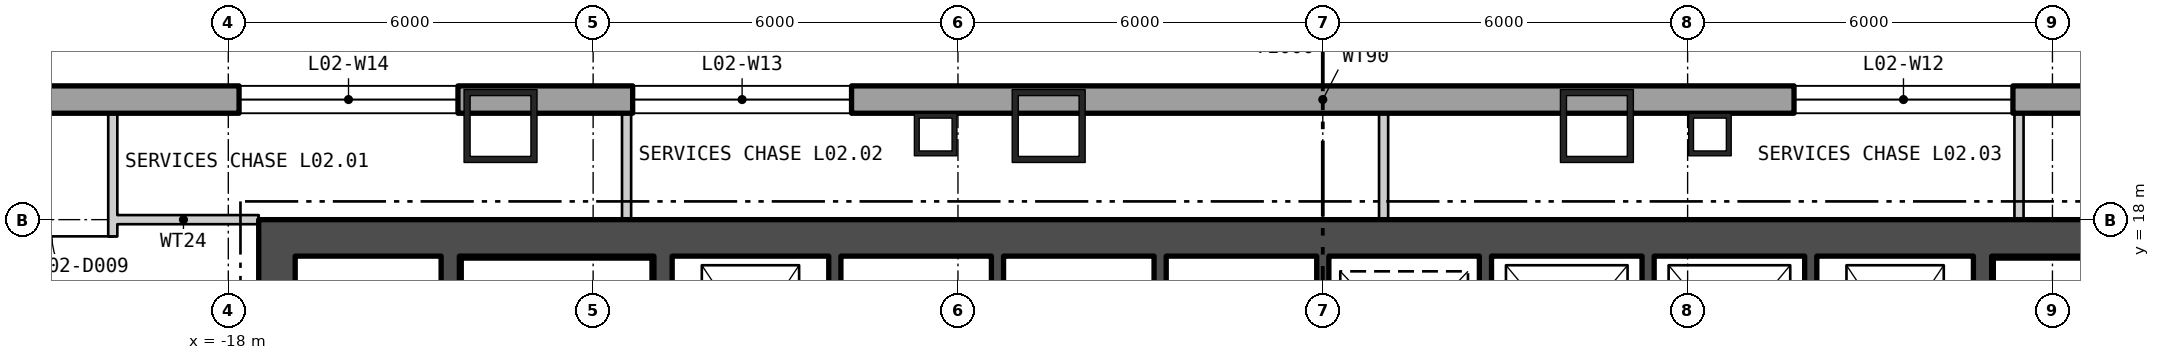
"""IFC4 building model, lengths in metres.
Left out: names, types, materials, properties, quantities, classifications, styles, units other than length and angle.
Written with IfcOpenShell. Run it as: python <this file> out.ifc"""

import sys

from ifc_helpers import new_model, si_unit, direction, frame, frame_2d, origin, origin_2d, place, context, subcontext, project, spatial, polyline, rectangle, hollow_rectangle, outline, extrude, element, fill, save


model = new_model("IFC4")
c1 = context("Model", 3, precision=1e-05, world=origin(), true_north=direction((0.0, 1.0)))
c2 = subcontext(c1, "Body", "Model", "MODEL_VIEW")
j1 = project(units=[si_unit("LENGTHUNIT", "METRE"), si_unit("PLANEANGLEUNIT", "RADIAN")], contexts=[c1])
p1 = place(None, origin())
s1 = spatial("IfcSite", under=j1, at=p1, CompositionType="ELEMENT")
p2 = place(p1, origin())
s2 = spatial("IfcBuilding", under=s1, at=p2, CompositionType="ELEMENT")
p3 = place(p2, frame((0.0, 0.0, 13.5)))
s3 = spatial("IfcBuildingStorey", under=s2, at=p3, CompositionType="ELEMENT", Elevation=13.5)
for number, where, z_axis, x_axis in (
    (1, (4.508, 19.54, 0.0), (0.0, 0.0, 1.0), (-1.0, 0.0, 0.0)),
    (2, (-4.508, 19.54, 0.0), (0.0, 0.0, 1.0), (-1.0, 0.0, 0.0)),
    (3, (-13.523, 19.54, 0.0), (0.0, 0.0, 1.0), (-1.0, 0.0, 0.0)),
):
    element("IfcColumn", number, at=place(p3, frame(where, z_axis=z_axis, x_axis=x_axis)), inside=s3, PredefinedType="COLUMN", context=c2, shape_type="SweptSolid", body=[
        extrude(hollow_rectangle(XDim=1.2, YDim=1.2, WallThickness=0.1, at=origin_2d()), origin(), (0.0, 0.0, 1.0), 5.1),
    ])
for number, where, z_axis, x_axis in (
    (4, (6.367, 19.4, 0.0), (0.0, 0.0, 1.0), (-1.0, 0.0, 0.0)),
    (5, (-6.367, 19.4, 0.0), (0.0, 0.0, 1.0), (-1.0, 0.0, 0.0)),
):
    element("IfcColumn", number, at=place(p3, frame(where, z_axis=z_axis, x_axis=x_axis)), inside=s3, PredefinedType="COLUMN", context=c2, shape_type="SweptSolid", body=[
        extrude(hollow_rectangle(XDim=0.7, YDim=0.7, WallThickness=0.08, at=origin_2d()), origin(), (0.0, 0.0, 1.0), 5.1),
    ])
p4 = place(p3, frame((38.775, 19.975, -0.4), z_axis=(0.0, 0.0, 1.0), x_axis=(-1.0, 0.0, 0.0)))
e6 = element("IfcWall", 6, at=p4, inside=s3, PredefinedType="SOLIDWALL", context=c2, shape_type="SweptSolid", body=[
    extrude(outline(polyline([(-0.225, -0.225), (77.775, -0.225), (77.325, 0.225), (0.225, 0.225), (-0.225, -0.225)])), origin(), (0.0, 0.0, 1.0), 5.1),
])
p5 = place(p4, frame((1.958, 0.0, 1.3)))
e7 = element("IfcOpeningElement", 7, at=p5, cuts=e6, PredefinedType="OPENING", context=c2, shape_type="SweptSolid", body=[
    extrude(rectangle(XDim=3.6, YDim=3.2, at=frame_2d((1.8, 1.6))), frame((0.0, 0.235, 0.0), z_axis=(0.0, -1.0, 0.0), x_axis=(1.0, 0.0, 0.0)), (0.0, 0.0, 1.0), 0.47),
])
p6 = place(p4, frame((8.325, 0.0, 1.3)))
e8 = element("IfcOpeningElement", 8, at=p6, cuts=e6, PredefinedType="OPENING", context=c2, shape_type="SweptSolid", body=[
    extrude(rectangle(XDim=3.6, YDim=3.2, at=frame_2d((1.8, 1.6))), frame((0.0, 0.235, 0.0), z_axis=(0.0, -1.0, 0.0), x_axis=(1.0, 0.0, 0.0)), (0.0, 0.0, 1.0), 0.47),
])
p7 = place(p4, frame((20.952, 0.0, 1.3)))
e9 = element("IfcOpeningElement", 9, at=p7, cuts=e6, PredefinedType="OPENING", context=c2, shape_type="SweptSolid", body=[
    extrude(rectangle(XDim=3.6, YDim=3.2, at=frame_2d((1.8, 1.6))), frame((0.0, 0.235, 0.0), z_axis=(0.0, -1.0, 0.0), x_axis=(1.0, 0.0, 0.0)), (0.0, 0.0, 1.0), 0.47),
])
p8 = place(p4, frame((27.425, 0.0, 1.3)))
e10 = element("IfcOpeningElement", 10, at=p8, cuts=e6, PredefinedType="OPENING", context=c2, shape_type="SweptSolid", body=[
    extrude(rectangle(XDim=3.6, YDim=3.2, at=frame_2d((1.8, 1.6))), frame((0.0, 0.235, 0.0), z_axis=(0.0, -1.0, 0.0), x_axis=(1.0, 0.0, 0.0)), (0.0, 0.0, 1.0), 0.47),
])
p9 = place(p4, frame((46.525, 0.0, 1.3)))
e11 = element("IfcOpeningElement", 11, at=p9, cuts=e6, PredefinedType="OPENING", context=c2, shape_type="SweptSolid", body=[
    extrude(rectangle(XDim=3.6, YDim=3.2, at=frame_2d((1.8, 1.6))), frame((0.0, 0.235, 0.0), z_axis=(0.0, -1.0, 0.0), x_axis=(1.0, 0.0, 0.0)), (0.0, 0.0, 1.0), 0.47),
])
p10 = place(p4, frame((52.998, 0.0, 1.3)))
e12 = element("IfcOpeningElement", 12, at=p10, cuts=e6, PredefinedType="OPENING", context=c2, shape_type="SweptSolid", body=[
    extrude(rectangle(XDim=3.6, YDim=3.2, at=frame_2d((1.8, 1.6))), frame((0.0, 0.235, 0.0), z_axis=(0.0, -1.0, 0.0), x_axis=(1.0, 0.0, 0.0)), (0.0, 0.0, 1.0), 0.47),
])
p11 = place(p4, frame((65.625, 0.0, 1.3)))
e13 = element("IfcOpeningElement", 13, at=p11, cuts=e6, PredefinedType="OPENING", context=c2, shape_type="SweptSolid", body=[
    extrude(rectangle(XDim=3.6, YDim=3.2, at=frame_2d((1.8, 1.6))), frame((0.0, 0.235, 0.0), z_axis=(0.0, -1.0, 0.0), x_axis=(1.0, 0.0, 0.0)), (0.0, 0.0, 1.0), 0.47),
])
p12 = place(p4, frame((71.992, 0.0, 1.3)))
e14 = element("IfcOpeningElement", 14, at=p12, cuts=e6, PredefinedType="OPENING", context=c2, shape_type="SweptSolid", body=[
    extrude(rectangle(XDim=3.6, YDim=3.2, at=frame_2d((1.8, 1.6))), frame((0.0, 0.235, 0.0), z_axis=(0.0, -1.0, 0.0), x_axis=(1.0, 0.0, 0.0)), (0.0, 0.0, 1.0), 0.47),
])
p13 = place(p3, frame((-17.5, 17.7, 0.0), z_axis=(0.0, 0.0, 1.0), x_axis=(1.0, 0.0, 0.0)))
e15 = element("IfcWall", 15, at=p13, inside=s3, PredefinedType="SHEAR", context=c2, shape_type="SweptSolid", body=[
    extrude(rectangle(XDim=35.0, YDim=0.6, at=frame_2d((17.5, 0.0))), origin(), (0.0, 0.0, 1.0), 4.88),
])
p14 = place(p3, frame((-17.2, 0.6, 0.0), z_axis=(0.0, 0.0, 1.0), x_axis=(0.0, 1.0, 0.0)))
e16 = element("IfcWall", 16, at=p14, inside=s3, PredefinedType="SHEAR", context=c2, shape_type="SweptSolid", body=[
    extrude(rectangle(XDim=16.8, YDim=0.6, at=frame_2d((8.4, 0.0))), origin(), (0.0, 0.0, 1.0), 4.88),
])
p15 = place(p14, frame((5.7, 0.0, 0.0)))
e17 = element("IfcOpeningElement", 17, at=p15, cuts=e16, PredefinedType="OPENING", context=c2, shape_type="SweptSolid", body=[
    extrude(rectangle(XDim=1.5, YDim=2.1, at=frame_2d((0.75, 1.05))), frame((0.0, 0.31, 0.0), z_axis=(0.0, -1.0, 0.0), x_axis=(1.0, 0.0, 0.0)), (0.0, 0.0, 1.0), 0.62),
])
p16 = place(p14, frame((0.453, 0.0, 0.0)))
e18 = element("IfcOpeningElement", 18, at=p16, cuts=e16, PredefinedType="OPENING", context=c2, shape_type="SweptSolid", body=[
    extrude(rectangle(XDim=1.0, YDim=2.1, at=frame_2d((0.5, 1.05))), frame((0.0, 0.31, 0.0), z_axis=(0.0, -1.0, 0.0), x_axis=(1.0, 0.0, 0.0)), (0.0, 0.0, 1.0), 0.62),
])
p17 = place(p14, frame((3.353, 0.0, 0.0)))
e19 = element("IfcOpeningElement", 19, at=p17, cuts=e16, PredefinedType="OPENING", context=c2, shape_type="SweptSolid", body=[
    extrude(rectangle(XDim=0.9, YDim=2.1, at=frame_2d((0.45, 1.05))), frame((0.0, 0.31, 0.0), z_axis=(0.0, -1.0, 0.0), x_axis=(1.0, 0.0, 0.0)), (0.0, 0.0, 1.0), 0.62),
])
p18 = place(p14, frame((7.886, 0.0, 0.0)))
e20 = element("IfcOpeningElement", 20, at=p18, cuts=e16, PredefinedType="OPENING", context=c2, shape_type="SweptSolid", body=[
    extrude(rectangle(XDim=0.9, YDim=2.1, at=frame_2d((0.45, 1.05))), frame((0.0, 0.31, 0.0), z_axis=(0.0, -1.0, 0.0), x_axis=(1.0, 0.0, 0.0)), (0.0, 0.0, 1.0), 0.62),
])
p19 = place(p14, frame((12.686, 0.0, 0.0)))
e21 = element("IfcOpeningElement", 21, at=p19, cuts=e16, PredefinedType="OPENING", context=c2, shape_type="SweptSolid", body=[
    extrude(rectangle(XDim=0.9, YDim=2.1, at=frame_2d((0.45, 1.05))), frame((0.0, 0.31, 0.0), z_axis=(0.0, -1.0, 0.0), x_axis=(1.0, 0.0, 0.0)), (0.0, 0.0, 1.0), 0.62),
])
p20 = place(p3, frame((-10.85, 0.6, 0.0), z_axis=(0.0, 0.0, 1.0), x_axis=(0.0, 1.0, 0.0)))
e22 = element("IfcWall", 22, at=p20, inside=s3, PredefinedType="SHEAR", context=c2, shape_type="SweptSolid", body=[
    extrude(rectangle(XDim=16.8, YDim=0.3, at=frame_2d((8.4, 0.0))), origin(), (0.0, 0.0, 1.0), 4.88),
])
p21 = place(p20, frame((5.075, 0.0, 0.0)))
e23 = element("IfcOpeningElement", 23, at=p21, cuts=e22, PredefinedType="OPENING", context=c2, shape_type="SweptSolid", body=[
    extrude(rectangle(XDim=1.25, YDim=2.1, at=frame_2d((0.625, 1.05))), frame((0.0, 0.16, 0.0), z_axis=(0.0, -1.0, 0.0), x_axis=(1.0, 0.0, 0.0)), (0.0, 0.0, 1.0), 0.32),
])
p22 = place(p20, frame((1.525, 0.0, 0.0)))
e24 = element("IfcOpeningElement", 24, at=p22, cuts=e22, PredefinedType="OPENING", context=c2, shape_type="SweptSolid", body=[
    extrude(rectangle(XDim=1.0, YDim=2.1, at=frame_2d((0.5, 1.05))), frame((0.0, 0.16, 0.0), z_axis=(0.0, -1.0, 0.0), x_axis=(1.0, 0.0, 0.0)), (0.0, 0.0, 1.0), 0.32),
])
p23 = place(p3, frame((-14.35, 0.6, 0.0), z_axis=(0.0, 0.0, 1.0), x_axis=(0.0, 1.0, 0.0)))
e25 = element("IfcWall", 25, at=p23, inside=s3, PredefinedType="SHEAR", context=c2, shape_type="SweptSolid", body=[
    extrude(rectangle(XDim=16.8, YDim=0.3, at=frame_2d((8.4, 0.0))), origin(), (0.0, 0.0, 1.0), 4.88),
])
p24 = place(p23, frame((5.7, 0.0, 0.0)))
e26 = element("IfcOpeningElement", 26, at=p24, cuts=e25, PredefinedType="OPENING", context=c2, shape_type="SweptSolid", body=[
    extrude(rectangle(XDim=1.5, YDim=2.1, at=frame_2d((0.75, 1.05))), frame((0.0, 0.16, 0.0), z_axis=(0.0, -1.0, 0.0), x_axis=(1.0, 0.0, 0.0)), (0.0, 0.0, 1.0), 0.32),
])
p25 = place(p3, frame((10.85, 0.6, 0.0), z_axis=(0.0, 0.0, 1.0), x_axis=(0.0, 1.0, 0.0)))
e27 = element("IfcWall", 27, at=p25, inside=s3, PredefinedType="SHEAR", context=c2, shape_type="SweptSolid", body=[
    extrude(rectangle(XDim=16.8, YDim=0.3, at=frame_2d((8.4, 0.0))), origin(), (0.0, 0.0, 1.0), 4.88),
])
p26 = place(p25, frame((5.075, 0.0, 0.0)))
e28 = element("IfcOpeningElement", 28, at=p26, cuts=e27, PredefinedType="OPENING", context=c2, shape_type="SweptSolid", body=[
    extrude(rectangle(XDim=1.25, YDim=2.1, at=frame_2d((0.625, 1.05))), frame((0.0, 0.16, 0.0), z_axis=(0.0, -1.0, 0.0), x_axis=(1.0, 0.0, 0.0)), (0.0, 0.0, 1.0), 0.32),
])
p27 = place(p25, frame((1.525, 0.0, 0.0)))
e29 = element("IfcOpeningElement", 29, at=p27, cuts=e27, PredefinedType="OPENING", context=c2, shape_type="SweptSolid", body=[
    extrude(rectangle(XDim=1.0, YDim=2.1, at=frame_2d((0.5, 1.05))), frame((0.0, 0.16, 0.0), z_axis=(0.0, -1.0, 0.0), x_axis=(1.0, 0.0, 0.0)), (0.0, 0.0, 1.0), 0.32),
])
for number, where, z_axis, x_axis in (
    (30, (-8.025, 14.7, 0.0), (0.0, 0.0, 1.0), (0.0, 1.0, 0.0)),
    (31, (-5.35, 14.7, 0.0), (0.0, 0.0, 1.0), (0.0, 1.0, 0.0)),
    (32, (-2.675, 14.7, 0.0), (0.0, 0.0, 1.0), (0.0, 1.0, 0.0)),
    (33, (0.0, 14.7, 0.0), (0.0, 0.0, 1.0), (0.0, 1.0, 0.0)),
    (34, (2.675, 14.7, 0.0), (0.0, 0.0, 1.0), (0.0, 1.0, 0.0)),
    (35, (5.35, 14.7, 0.0), (0.0, 0.0, 1.0), (0.0, 1.0, 0.0)),
    (36, (8.025, 14.7, 0.0), (0.0, 0.0, 1.0), (0.0, 1.0, 0.0)),
):
    element("IfcWall", number, at=place(p3, frame(where, z_axis=z_axis, x_axis=x_axis)), inside=s3, PredefinedType="SHEAR", context=c2, shape_type="SweptSolid", body=[
        extrude(rectangle(XDim=2.7, YDim=0.2, at=frame_2d((1.35, 0.0))), origin(), (0.0, 0.0, 1.0), 4.88),
    ])
p28 = place(p3, frame((-19.975, 18.0, 0.0), z_axis=(0.0, 0.0, 1.0), x_axis=(1.0, 0.0, 0.0)))
e37 = element("IfcWall", 37, at=p28, inside=s3, PredefinedType="PARTITIONING", context=c2, shape_type="SweptSolid", body=[
    extrude(rectangle(XDim=2.475, YDim=0.15, at=frame_2d((1.238, 0.0))), origin(), (0.0, 0.0, 1.0), 4.33),
])
p29 = place(p3, frame((-19.9, 1.025, 0.0), z_axis=(0.0, 0.0, 1.0), x_axis=(0.0, 1.0, 0.0)))
e38 = element("IfcWall", 38, at=p29, inside=s3, PredefinedType="PARTITIONING", context=c2, shape_type="SweptSolid", body=[
    extrude(rectangle(XDim=16.9, YDim=0.15, at=frame_2d((8.45, 0.0))), origin(), (0.0, 0.0, 1.0), 4.88),
])
p30 = place(p29, frame((8.644, 0.0, 0.0)))
e39 = element("IfcOpeningElement", 39, at=p30, cuts=e38, PredefinedType="OPENING", context=c2, shape_type="SweptSolid", body=[
    extrude(rectangle(XDim=1.0, YDim=2.1, at=frame_2d((0.5, 1.05))), frame((0.0, 0.085, 0.0), z_axis=(0.0, -1.0, 0.0), x_axis=(1.0, 0.0, 0.0)), (0.0, 0.0, 1.0), 0.17),
])
p31 = place(p29, frame((15.7, 0.0, 0.0)))
e40 = element("IfcOpeningElement", 40, at=p31, cuts=e38, PredefinedType="OPENING", context=c2, shape_type="SweptSolid", body=[
    extrude(rectangle(XDim=1.0, YDim=2.1, at=frame_2d((0.5, 1.05))), frame((0.0, 0.085, 0.0), z_axis=(0.0, -1.0, 0.0), x_axis=(1.0, 0.0, 0.0)), (0.0, 0.0, 1.0), 0.17),
])
p32 = place(p3, frame((-19.9, 18.075, 0.0), z_axis=(0.0, 0.0, 1.0), x_axis=(0.0, 1.0, 0.0)))
e41 = element("IfcWall", 41, at=p32, inside=s3, PredefinedType="PARTITIONING", context=c2, shape_type="SweptSolid", body=[
    extrude(rectangle(XDim=1.675, YDim=0.15, at=frame_2d((0.838, 0.0))), origin(), (0.0, 0.0, 1.0), 4.88),
])
for number, where, z_axis, x_axis in (
    (42, (-11.45, 18.0, 0.0), (0.0, 0.0, 1.0), (0.0, 1.0, 0.0)),
    (43, (1.0, 18.0, 0.0), (0.0, 0.0, 1.0), (0.0, 1.0, 0.0)),
    (44, (11.45, 18.0, 0.0), (0.0, 0.0, 1.0), (0.0, 1.0, 0.0)),
):
    element("IfcWall", number, at=place(p3, frame(where, z_axis=z_axis, x_axis=x_axis)), inside=s3, PredefinedType="PARTITIONING", context=c2, shape_type="SweptSolid", body=[
        extrude(rectangle(XDim=1.75, YDim=0.15, at=frame_2d((0.875, 0.0))), origin(), (0.0, 0.0, 1.0), 4.88),
    ])
p33 = place(p8, origin())
e45 = element("IfcWindow", 45, at=p33, inside=s3, PartitioningType="SINGLE_PANEL", PredefinedType="WINDOW", context=c2, shape_type="SweptSolid", body=[
    extrude(rectangle(XDim=3.6, YDim=3.2, at=frame_2d((1.8, 1.6))), frame((0.0, 0.105, 0.0), z_axis=(0.0, -1.0, 0.0), x_axis=(1.0, 0.0, 0.0)), (0.0, 0.0, 1.0), 0.06),
])
fill(e10, e45)
p34 = place(p9, origin())
e46 = element("IfcWindow", 46, at=p34, inside=s3, PartitioningType="SINGLE_PANEL", PredefinedType="WINDOW", context=c2, shape_type="SweptSolid", body=[
    extrude(rectangle(XDim=3.6, YDim=3.2, at=frame_2d((1.8, 1.6))), frame((0.0, 0.105, 0.0), z_axis=(0.0, -1.0, 0.0), x_axis=(1.0, 0.0, 0.0)), (0.0, 0.0, 1.0), 0.06),
])
fill(e11, e46)
p35 = place(p10, origin())
e47 = element("IfcWindow", 47, at=p35, inside=s3, PartitioningType="SINGLE_PANEL", PredefinedType="WINDOW", context=c2, shape_type="SweptSolid", body=[
    extrude(rectangle(XDim=3.6, YDim=3.2, at=frame_2d((1.8, 1.6))), frame((0.0, 0.105, 0.0), z_axis=(0.0, -1.0, 0.0), x_axis=(1.0, 0.0, 0.0)), (0.0, 0.0, 1.0), 0.06),
])
fill(e12, e47)
p36 = place(p31, origin())
e48 = element("IfcDoor", 48, at=p36, inside=s3, OperationType="SINGLE_SWING_LEFT", PredefinedType="DOOR", context=c2, shape_type="SweptSolid", body=[
    extrude(rectangle(XDim=1.0, YDim=2.1, at=frame_2d((0.5, 1.05))), frame((0.0, 0.025, 0.0), z_axis=(0.0, -1.0, 0.0), x_axis=(1.0, 0.0, 0.0)), (0.0, 0.0, 1.0), 0.05),
])
fill(e40, e48)
save(model, sys.argv[1])
